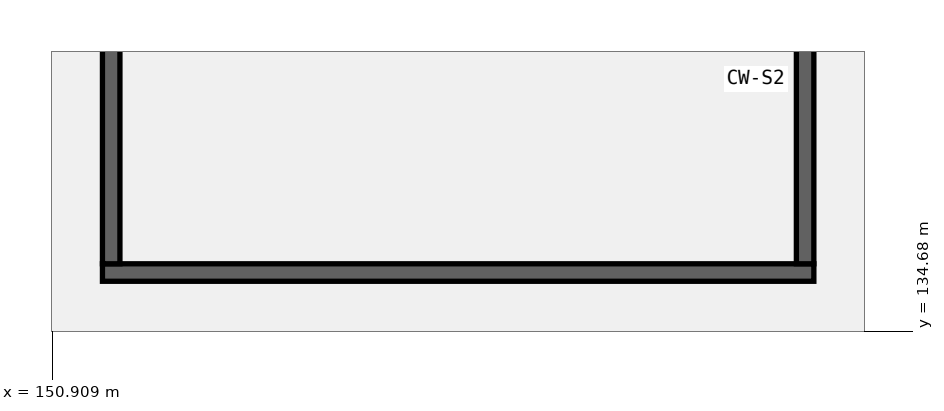
"""IFC4 building model, lengths in metres.
Left out: names, types, materials, properties, quantities, classifications, styles, units other than length and angle.
Written with IfcOpenShell. Run it as: python <this file> out.ifc"""

import sys

from ifc_helpers import new_model, si_unit, direction, frame, frame_2d, origin, place, context, subcontext, project, spatial, rectangle, extrude, element, save


model = new_model("IFC4")
c1 = context("Model", 3, precision=1e-05, world=origin(), true_north=direction((0.0, 1.0)))
c2 = subcontext(c1, "Body", "Model", "MODEL_VIEW")
j1 = project(units=[si_unit("LENGTHUNIT", "METRE"), si_unit("PLANEANGLEUNIT", "RADIAN")], contexts=[c1])
p1 = place(None, origin())
s1 = spatial("IfcSite", under=j1, at=p1, CompositionType="ELEMENT")
p2 = place(p1, origin())
s2 = spatial("IfcBuilding", under=s1, at=p2, CompositionType="ELEMENT")
p3 = place(p2, frame((0.0, 0.0, -4.8)))
s3 = spatial("IfcBuildingStorey", under=s2, at=p3, CompositionType="ELEMENT", Elevation=-4.8)
p4 = place(p3, frame((151.57, 135.455, 0.0), z_axis=(0.0, 0.0, 1.0), x_axis=(1.0, 0.0, 0.0)))
e1 = element("IfcWall", 1, at=p4, inside=s3, PredefinedType="SHEAR", context=c2, shape_type="SweptSolid", body=[
    extrude(rectangle(XDim=9.36, YDim=0.23, at=frame_2d((4.68, 0.0))), origin(), (0.0, 0.0, 1.0), 4.5),
])
for number, where, z_axis, x_axis in (
    (2, (151.685, 135.57, 0.0), (0.0, 0.0, 1.0), (0.0, 1.0, 0.0)),
    (3, (160.815, 135.57, 0.0), (0.0, 0.0, 1.0), (0.0, 1.0, 0.0)),
):
    element("IfcWall", number, at=place(p3, frame(where, z_axis=z_axis, x_axis=x_axis)), inside=s3, PredefinedType="SHEAR", context=c2, shape_type="SweptSolid", body=[
        extrude(rectangle(XDim=4.86, YDim=0.23, at=frame_2d((2.43, 0.0))), origin(), (0.0, 0.0, 1.0), 4.5),
    ])
save(model, sys.argv[1])
